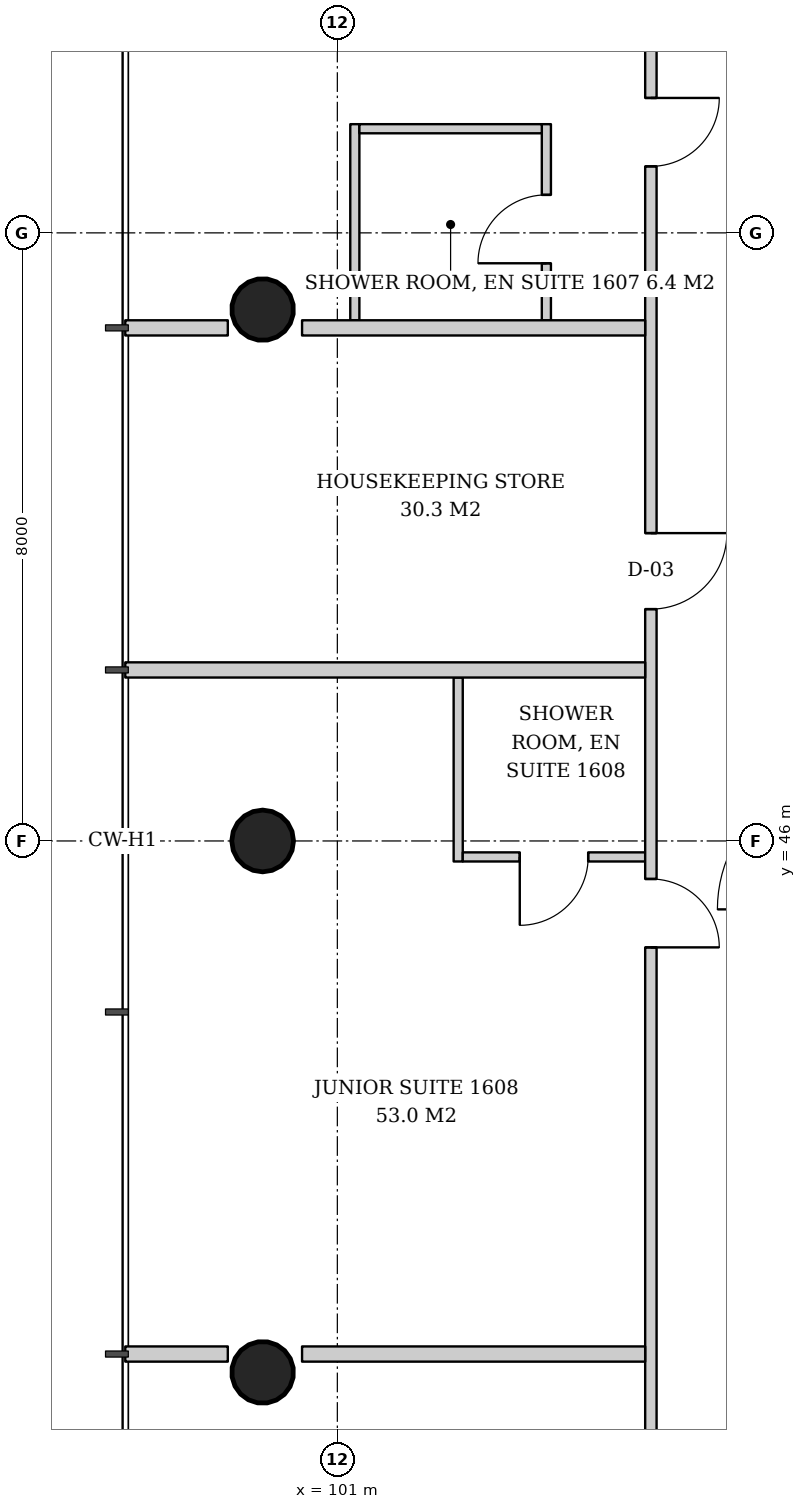
"""IFC4 building model, lengths in metres.
Left out: names, types, materials, properties, quantities, classifications, styles, units other than length and angle.
Written with IfcOpenShell. Run it as: python <this file> out.ifc"""

import sys

from ifc_helpers import new_model, si_unit, direction, frame, frame_2d, origin, origin_2d, place, context, subcontext, project, spatial, rectangle, hollow_circle, extrude, element, fill, save


model = new_model("IFC4")
c1 = context("Model", 3, precision=1e-05, world=origin(), true_north=direction((0.0, 1.0)))
c2 = subcontext(c1, "Body", "Model", "MODEL_VIEW")
j1 = project(units=[si_unit("LENGTHUNIT", "METRE"), si_unit("PLANEANGLEUNIT", "RADIAN")], contexts=[c1])
p1 = place(None, origin())
s1 = spatial("IfcSite", under=j1, at=p1, CompositionType="ELEMENT")
p2 = place(p1, origin())
s2 = spatial("IfcBuilding", under=s1, at=p2, CompositionType="ELEMENT")
p3 = place(p2, frame((0.0, 0.0, 66.6)))
s3 = spatial("IfcBuildingStorey", under=s2, at=p3, CompositionType="ELEMENT", Elevation=66.6)
p4 = place(p3, frame((99.966, 53.017, 0.0), z_axis=(0.043062285527, -0.021563230905, 0.998839660125), x_axis=(0.44774654769, 0.894160516368, 0.0)))
e1 = element("IfcColumn", 1, at=p4, inside=s3, PredefinedType="COLUMN", context=c2, shape_type="SweptSolid", body=[
    extrude(hollow_circle(Radius=0.406, WallThickness=0.03, at=origin_2d()), origin(), (0.0, 0.0, 1.0), 3.804),
])
p5 = place(p3, frame((99.966, 46.0, 0.0), z_axis=(0.043072300418, 0.0, 0.999071957837), x_axis=(0.0, 1.0, 0.0)))
e2 = element("IfcColumn", 2, at=p5, inside=s3, PredefinedType="COLUMN", context=c2, shape_type="SweptSolid", body=[
    extrude(hollow_circle(Radius=0.406, WallThickness=0.03, at=origin_2d()), origin(), (0.0, 0.0, 1.0), 3.803),
])
p6 = place(p3, frame((99.966, 38.983, 0.0), z_axis=(0.043062285527, 0.021563230905, 0.998839660125), x_axis=(-0.44774654769, 0.894160516368, 0.0)))
e3 = element("IfcColumn", 3, at=p6, inside=s3, PredefinedType="COLUMN", context=c2, shape_type="SweptSolid", body=[
    extrude(hollow_circle(Radius=0.406, WallThickness=0.03, at=origin_2d()), origin(), (0.0, 0.0, 1.0), 3.804),
])
p7 = place(p3, frame((103.75, 52.85, 0.0), z_axis=(0.0, 0.0, 1.0), x_axis=(0.0, 1.0, 0.0)))
e4 = element("IfcWall", 4, at=p7, inside=s3, PredefinedType="PARTITIONING", context=c2, shape_type="SweptSolid", body=[
    extrude(rectangle(XDim=2.58, YDim=0.12, at=frame_2d((1.29, 0.0))), origin(), (0.0, 0.0, 1.0), 2.8),
])
p8 = place(p7, frame((0.75, 0.0, 0.0)))
e5 = element("IfcOpeningElement", 5, at=p8, cuts=e4, PredefinedType="OPENING", context=c2, shape_type="SweptSolid", body=[
    extrude(rectangle(XDim=0.9, YDim=2.1, at=frame_2d((0.45, 1.05))), frame((0.0, 0.07, 0.0), z_axis=(0.0, -1.0, 0.0), x_axis=(1.0, 0.0, 0.0)), (0.0, 0.0, 1.0), 0.14),
])
p9 = place(p3, frame((101.23, 52.85, 0.0), z_axis=(0.0, 0.0, 1.0), x_axis=(0.0, 1.0, 0.0)))
e6 = element("IfcWall", 6, at=p9, inside=s3, PredefinedType="PARTITIONING", context=c2, shape_type="SweptSolid", body=[
    extrude(rectangle(XDim=2.58, YDim=0.12, at=frame_2d((1.29, 0.0))), origin(), (0.0, 0.0, 1.0), 2.8),
])
p10 = place(p3, frame((103.69, 55.37, 0.0), z_axis=(0.0, 0.0, 1.0), x_axis=(-1.0, 0.0, 0.0)))
e7 = element("IfcWall", 7, at=p10, inside=s3, PredefinedType="PARTITIONING", context=c2, shape_type="SweptSolid", body=[
    extrude(rectangle(XDim=2.4, YDim=0.12, at=frame_2d((1.2, 0.0))), origin(), (0.0, 0.0, 1.0), 2.8),
])
p11 = place(p3, frame((102.59, 48.15, 0.0), z_axis=(0.0, 0.0, 1.0), x_axis=(0.0, -1.0, 0.0)))
e8 = element("IfcWall", 8, at=p11, inside=s3, PredefinedType="PARTITIONING", context=c2, shape_type="SweptSolid", body=[
    extrude(rectangle(XDim=2.42, YDim=0.12, at=frame_2d((1.21, 0.0))), origin(), (0.0, 0.0, 1.0), 2.847),
])
p12 = place(p3, frame((105.05, 45.79, 0.0), z_axis=(0.0, 0.0, 1.0), x_axis=(-1.0, 0.0, 0.0)))
e9 = element("IfcWall", 9, at=p12, inside=s3, PredefinedType="PARTITIONING", context=c2, shape_type="SweptSolid", body=[
    extrude(rectangle(XDim=2.4, YDim=0.12, at=frame_2d((1.2, 0.0))), origin(), (0.0, 0.0, 1.0), 3.6),
])
p13 = place(p12, frame((0.75, 0.0, 0.0)))
e10 = element("IfcOpeningElement", 10, at=p13, cuts=e9, PredefinedType="OPENING", context=c2, shape_type="SweptSolid", body=[
    extrude(rectangle(XDim=0.9, YDim=2.1, at=frame_2d((0.45, 1.05))), frame((0.0, 0.07, 0.0), z_axis=(0.0, -1.0, 0.0), x_axis=(1.0, 0.0, 0.0)), (0.0, 0.0, 1.0), 0.14),
])
p14 = place(p3, frame((105.125, 57.95, 0.0), z_axis=(0.0, 0.0, 1.0), x_axis=(0.0, -1.0, 0.0)))
e11 = element("IfcWall", 11, at=p14, inside=s3, PredefinedType="PARTITIONING", context=c2, shape_type="SweptSolid", body=[
    extrude(rectangle(XDim=23.75, YDim=0.15, at=frame_2d((11.875, 0.0))), origin(), (0.0, 0.0, 1.0), 2.8),
])
p15 = place(p14, frame((2.175, 0.0, 0.0)))
e12 = element("IfcOpeningElement", 12, at=p15, cuts=e11, PredefinedType="OPENING", context=c2, shape_type="SweptSolid", body=[
    extrude(rectangle(XDim=0.9, YDim=2.1, at=frame_2d((0.45, 1.05))), frame((0.0, 0.085, 0.0), z_axis=(0.0, -1.0, 0.0), x_axis=(1.0, 0.0, 0.0)), (0.0, 0.0, 1.0), 0.17),
])
p16 = place(p14, frame((7.9, 0.0, 0.0)))
e13 = element("IfcOpeningElement", 13, at=p16, cuts=e11, PredefinedType="OPENING", context=c2, shape_type="SweptSolid", body=[
    extrude(rectangle(XDim=1.0, YDim=2.1, at=frame_2d((0.5, 1.05))), frame((0.0, 0.085, 0.0), z_axis=(0.0, -1.0, 0.0), x_axis=(1.0, 0.0, 0.0)), (0.0, 0.0, 1.0), 0.17),
])
p17 = place(p14, frame((12.45, 0.0, 0.0)))
e14 = element("IfcOpeningElement", 14, at=p17, cuts=e11, PredefinedType="OPENING", context=c2, shape_type="SweptSolid", body=[
    extrude(rectangle(XDim=0.9, YDim=2.1, at=frame_2d((0.45, 1.05))), frame((0.0, 0.085, 0.0), z_axis=(0.0, -1.0, 0.0), x_axis=(1.0, 0.0, 0.0)), (0.0, 0.0, 1.0), 0.17),
])
p18 = place(p3, frame((105.05, 52.75, 0.0), z_axis=(0.0, 0.0, 1.0), x_axis=(-1.0, 0.0, 0.0)))
e15 = element("IfcWall", 15, at=p18, inside=s3, PredefinedType="PARTITIONING", context=c2, shape_type="SweptSolid", body=[
    extrude(rectangle(XDim=4.514, YDim=0.2, at=frame_2d((2.257, 0.0))), origin(), (0.0, 0.0, 1.0), 3.6),
])
p19 = place(p3, frame((99.559, 52.75, 0.0), z_axis=(0.0, 0.0, 1.0), x_axis=(-1.0, 0.0, 0.0)))
e16 = element("IfcWall", 16, at=p19, inside=s3, PredefinedType="PARTITIONING", context=c2, shape_type="SweptSolid", body=[
    extrude(rectangle(XDim=1.349, YDim=0.2, at=frame_2d((0.675, 0.0))), origin(), (0.0, 0.0, 1.0), 3.6),
])
p20 = place(p3, frame((105.05, 48.25, 0.0), z_axis=(0.0, 0.0, 1.0), x_axis=(-1.0, 0.0, 0.0)))
e17 = element("IfcWall", 17, at=p20, inside=s3, PredefinedType="PARTITIONING", context=c2, shape_type="SweptSolid", body=[
    extrude(rectangle(XDim=6.84, YDim=0.2, at=frame_2d((3.42, 0.0))), origin(), (0.0, 0.0, 1.0), 3.05),
])
p21 = place(p3, frame((105.05, 39.25, 0.0), z_axis=(0.0, 0.0, 1.0), x_axis=(-1.0, 0.0, 0.0)))
e18 = element("IfcWall", 18, at=p21, inside=s3, PredefinedType="PARTITIONING", context=c2, shape_type="SweptSolid", body=[
    extrude(rectangle(XDim=4.514, YDim=0.2, at=frame_2d((2.257, 0.0))), origin(), (0.0, 0.0, 1.0), 3.6),
])
p22 = place(p3, frame((99.559, 39.25, 0.0), z_axis=(0.0, 0.0, 1.0), x_axis=(-1.0, 0.0, 0.0)))
e19 = element("IfcWall", 19, at=p22, inside=s3, PredefinedType="PARTITIONING", context=c2, shape_type="SweptSolid", body=[
    extrude(rectangle(XDim=1.349, YDim=0.2, at=frame_2d((0.675, 0.0))), origin(), (0.0, 0.0, 1.0), 3.6),
])
p23 = place(p8, origin())
e20 = element("IfcDoor", 20, at=p23, inside=s3, OperationType="SINGLE_SWING_LEFT", PredefinedType="DOOR", context=c2, shape_type="SweptSolid", body=[
    extrude(rectangle(XDim=0.9, YDim=2.1, at=frame_2d((0.45, 1.05))), frame((0.0, 0.025, 0.0), z_axis=(0.0, -1.0, 0.0), x_axis=(1.0, 0.0, 0.0)), (0.0, 0.0, 1.0), 0.05),
])
fill(e5, e20)
p24 = place(p13, origin())
e21 = element("IfcDoor", 21, at=p24, inside=s3, OperationType="SINGLE_SWING_RIGHT", PredefinedType="DOOR", context=c2, shape_type="SweptSolid", body=[
    extrude(rectangle(XDim=0.9, YDim=2.1, at=frame_2d((0.45, 1.05))), frame((0.0, 0.025, 0.0), z_axis=(0.0, -1.0, 0.0), x_axis=(1.0, 0.0, 0.0)), (0.0, 0.0, 1.0), 0.05),
])
fill(e10, e21)
p25 = place(p15, origin())
e22 = element("IfcDoor", 22, at=p25, inside=s3, OperationType="SINGLE_SWING_LEFT", PredefinedType="DOOR", context=c2, shape_type="SweptSolid", body=[
    extrude(rectangle(XDim=0.9, YDim=2.1, at=frame_2d((0.45, 1.05))), frame((0.0, 0.025, 0.0), z_axis=(0.0, -1.0, 0.0), x_axis=(1.0, 0.0, 0.0)), (0.0, 0.0, 1.0), 0.05),
])
fill(e12, e22)
p26 = place(p16, origin())
e23 = element("IfcDoor", 23, at=p26, inside=s3, OperationType="SINGLE_SWING_LEFT", PredefinedType="DOOR", context=c2, shape_type="SweptSolid", body=[
    extrude(rectangle(XDim=1.0, YDim=2.1, at=frame_2d((0.5, 1.05))), frame((0.0, 0.025, 0.0), z_axis=(0.0, -1.0, 0.0), x_axis=(1.0, 0.0, 0.0)), (0.0, 0.0, 1.0), 0.05),
])
fill(e13, e23)
p27 = place(p17, origin())
e24 = element("IfcDoor", 24, at=p27, inside=s3, OperationType="SINGLE_SWING_RIGHT", PredefinedType="DOOR", context=c2, shape_type="SweptSolid", body=[
    extrude(rectangle(XDim=0.9, YDim=2.1, at=frame_2d((0.45, 1.05))), frame((0.0, 0.025, 0.0), z_axis=(0.0, -1.0, 0.0), x_axis=(1.0, 0.0, 0.0)), (0.0, 0.0, 1.0), 0.05),
])
fill(e14, e24)
save(model, sys.argv[1])
